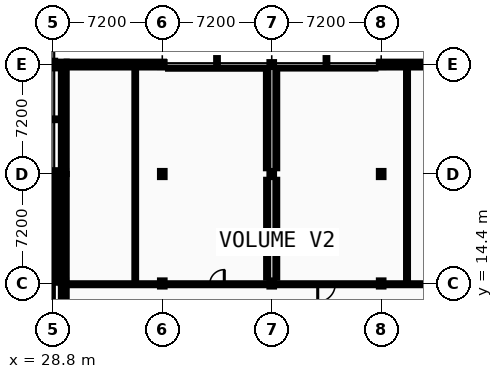
"""IFC4 building model, lengths in metres.
Left out: names, types, materials, properties, quantities, classifications, styles, units other than length and angle.
Written with IfcOpenShell. Run it as: python <this file> out.ifc"""

import sys

from ifc_helpers import new_model, si_unit, direction, frame, frame_2d, origin, origin_2d, place, context, subcontext, project, spatial, rectangle, i_section, extrude, element, fill, save


model = new_model("IFC4")
c1 = context("Model", 3, precision=1e-05, world=origin(), true_north=direction((0.0, 1.0)))
c2 = subcontext(c1, "Body", "Model", "MODEL_VIEW")
j1 = project(units=[si_unit("LENGTHUNIT", "METRE"), si_unit("PLANEANGLEUNIT", "RADIAN")], contexts=[c1])
p1 = place(None, origin())
s1 = spatial("IfcSite", under=j1, at=p1, CompositionType="ELEMENT")
p2 = place(p1, origin())
s2 = spatial("IfcBuilding", under=s1, at=p2, CompositionType="ELEMENT")
p3 = place(p2, frame((0.0, 0.0, 5.2)))
s3 = spatial("IfcBuildingStorey", under=s2, at=p3, CompositionType="ELEMENT", Elevation=5.2)
for number, where, z_axis, x_axis in (
    (1, (28.8, 21.6, 0.0), (0.0, 0.0, 1.0), (1.0, 0.0, 0.0)),
    (2, (28.8, 28.8, 0.0), (0.0, 0.0, 1.0), (1.0, 0.0, 0.0)),
):
    element("IfcColumn", number, at=place(p3, frame(where, z_axis=z_axis, x_axis=x_axis)), inside=s3, PredefinedType="COLUMN", context=c2, shape_type="SweptSolid", body=[
        extrude(i_section(OverallWidth=0.3, OverallDepth=0.5, WebThickness=0.014, FlangeThickness=0.028, FilletRadius=0.027, at=origin_2d()), origin(), (0.0, 0.0, 1.0), 4.4),
    ])
for number, where, z_axis, x_axis in (
    (3, (29.52, 14.4, 0.0), (0.0, 0.0, 1.0), (1.0, 0.0, 0.0)),
    (4, (29.52, 21.6, 0.0), (0.0, 0.0, 1.0), (1.0, 0.0, 0.0)),
):
    element("IfcColumn", number, at=place(p3, frame(where, z_axis=z_axis, x_axis=x_axis)), inside=s3, PredefinedType="COLUMN", context=c2, shape_type="SweptSolid", body=[
        extrude(i_section(OverallWidth=0.3, OverallDepth=0.4, WebThickness=0.013, FlangeThickness=0.024, FilletRadius=0.027, at=origin_2d()), origin(), (0.0, 0.0, 1.0), 4.4),
    ])
p4 = place(p3, frame((29.52, 28.8, 0.0), z_axis=(0.0, 0.0, 1.0), x_axis=(1.0, 0.0, 0.0)))
e5 = element("IfcColumn", 5, at=p4, inside=s3, PredefinedType="COLUMN", context=c2, shape_type="SweptSolid", body=[
    extrude(i_section(OverallWidth=0.3, OverallDepth=0.32, WebThickness=0.011, FlangeThickness=0.021, FilletRadius=0.027, at=origin_2d()), origin(), (0.0, 0.0, 1.0), 4.4),
])
for number, where, z_axis, x_axis in (
    (6, (36.0, 14.4, 0.0), (0.0, 0.0, 1.0), (1.0, 0.0, 0.0)),
    (7, (36.0, 21.6, 0.0), (0.0, 0.0, 1.0), (1.0, 0.0, 0.0)),
):
    element("IfcColumn", number, at=place(p3, frame(where, z_axis=z_axis, x_axis=x_axis)), inside=s3, PredefinedType="COLUMN", context=c2, shape_type="SweptSolid", body=[
        extrude(i_section(OverallWidth=0.3, OverallDepth=0.4, WebThickness=0.013, FlangeThickness=0.024, FilletRadius=0.027, at=origin_2d()), origin(), (0.0, 0.0, 1.0), 4.4),
    ])
p5 = place(p3, frame((36.0, 28.8, 0.0), z_axis=(0.0, 0.0, 1.0), x_axis=(1.0, 0.0, 0.0)))
e8 = element("IfcColumn", 8, at=p5, inside=s3, PredefinedType="COLUMN", context=c2, shape_type="SweptSolid", body=[
    extrude(i_section(OverallWidth=0.3, OverallDepth=0.32, WebThickness=0.011, FlangeThickness=0.021, FilletRadius=0.027, at=origin_2d()), origin(), (0.0, 0.0, 1.0), 4.4),
])
for number, where, z_axis, x_axis in (
    (9, (43.2, 14.4, 0.0), (0.0, 0.0, 1.0), (1.0, 0.0, 0.0)),
    (10, (43.2, 21.6, 0.0), (0.0, 0.0, 1.0), (1.0, 0.0, 0.0)),
):
    element("IfcColumn", number, at=place(p3, frame(where, z_axis=z_axis, x_axis=x_axis)), inside=s3, PredefinedType="COLUMN", context=c2, shape_type="SweptSolid", body=[
        extrude(i_section(OverallWidth=0.3, OverallDepth=0.4, WebThickness=0.013, FlangeThickness=0.024, FilletRadius=0.027, at=origin_2d()), origin(), (0.0, 0.0, 1.0), 4.4),
    ])
p6 = place(p3, frame((43.2, 28.8, 0.0), z_axis=(0.0, 0.0, 1.0), x_axis=(1.0, 0.0, 0.0)))
e11 = element("IfcColumn", 11, at=p6, inside=s3, PredefinedType="COLUMN", context=c2, shape_type="SweptSolid", body=[
    extrude(i_section(OverallWidth=0.3, OverallDepth=0.32, WebThickness=0.011, FlangeThickness=0.021, FilletRadius=0.027, at=origin_2d()), origin(), (0.0, 0.0, 1.0), 4.4),
])
for number, where, z_axis, x_axis in (
    (12, (50.4, 14.4, 0.0), (0.0, 0.0, 1.0), (1.0, 0.0, 0.0)),
    (13, (50.4, 21.6, 0.0), (0.0, 0.0, 1.0), (1.0, 0.0, 0.0)),
):
    element("IfcColumn", number, at=place(p3, frame(where, z_axis=z_axis, x_axis=x_axis)), inside=s3, PredefinedType="COLUMN", context=c2, shape_type="SweptSolid", body=[
        extrude(i_section(OverallWidth=0.3, OverallDepth=0.4, WebThickness=0.013, FlangeThickness=0.024, FilletRadius=0.027, at=origin_2d()), origin(), (0.0, 0.0, 1.0), 4.4),
    ])
p7 = place(p3, frame((50.4, 28.8, 0.0), z_axis=(0.0, 0.0, 1.0), x_axis=(1.0, 0.0, 0.0)))
e14 = element("IfcColumn", 14, at=p7, inside=s3, PredefinedType="COLUMN", context=c2, shape_type="SweptSolid", body=[
    extrude(i_section(OverallWidth=0.3, OverallDepth=0.32, WebThickness=0.011, FlangeThickness=0.021, FilletRadius=0.027, at=origin_2d()), origin(), (0.0, 0.0, 1.0), 4.4),
])
p8 = place(p3, frame((28.8, 14.45, 0.0), z_axis=(0.0, 0.0, 1.0), x_axis=(0.0, 1.0, 0.0)))
e15 = element("IfcWall", 15, at=p8, inside=s3, PredefinedType="STANDARD", context=c2, shape_type="SweptSolid", body=[
    extrude(rectangle(XDim=7.15, YDim=0.38, at=frame_2d((3.575, 0.0))), origin(), (0.0, 0.0, 1.0), 4.185),
])
p9 = place(p8, frame((1.63, 0.0, 0.95)))
e16 = element("IfcOpeningElement", 16, at=p9, cuts=e15, PredefinedType="OPENING", context=c2, shape_type="SweptSolid", body=[
    extrude(rectangle(XDim=1.03, YDim=1.296, at=frame_2d((0.515, 0.648))), frame((0.0, 0.2, 0.0), z_axis=(0.0, -1.0, 0.0), x_axis=(1.0, 0.0, 0.0)), (0.0, 0.0, 1.0), 0.4),
])
p10 = place(p8, frame((4.49, 0.0, 0.95)))
e17 = element("IfcOpeningElement", 17, at=p10, cuts=e15, PredefinedType="OPENING", context=c2, shape_type="SweptSolid", body=[
    extrude(rectangle(XDim=1.03, YDim=1.296, at=frame_2d((0.515, 0.648))), frame((0.0, 0.2, 0.0), z_axis=(0.0, -1.0, 0.0), x_axis=(1.0, 0.0, 0.0)), (0.0, 0.0, 1.0), 0.4),
])
p11 = place(p3, frame((36.11, 28.8, 0.0), z_axis=(0.0, 0.0, 1.0), x_axis=(-1.0, 0.0, 0.0)))
e18 = element("IfcWall", 18, at=p11, inside=s3, PredefinedType="STANDARD", context=c2, shape_type="SweptSolid", body=[
    extrude(rectangle(XDim=6.4, YDim=0.38, at=frame_2d((3.2, 0.0))), origin(), (0.0, 0.0, 1.0), 3.88),
])
p12 = place(p3, frame((57.41, 28.8, 0.0), z_axis=(0.0, 0.0, 1.0), x_axis=(-1.0, 0.0, 0.0)))
e19 = element("IfcWall", 19, at=p12, inside=s3, PredefinedType="STANDARD", context=c2, shape_type="SweptSolid", body=[
    extrude(rectangle(XDim=7.12, YDim=0.38, at=frame_2d((3.56, 0.0))), origin(), (0.0, 0.0, 1.0), 3.88),
])
p13 = place(p12, frame((1.672, 0.0, 0.95)))
e20 = element("IfcOpeningElement", 20, at=p13, cuts=e19, PredefinedType="OPENING", context=c2, shape_type="SweptSolid", body=[
    extrude(rectangle(XDim=0.928, YDim=1.332, at=frame_2d((0.464, 0.666))), frame((0.0, 0.2, 0.0), z_axis=(0.0, -1.0, 0.0), x_axis=(1.0, 0.0, 0.0)), (0.0, 0.0, 1.0), 0.4),
])
p14 = place(p3, frame((29.52, 14.4, 0.0), z_axis=(0.0, 0.0, 1.0), x_axis=(0.0, -1.0, 0.0)))
e21 = element("IfcWall", 21, at=p14, inside=s3, PredefinedType="STANDARD", context=c2, shape_type="SweptSolid", body=[
    extrude(rectangle(XDim=5.5, YDim=0.38, at=frame_2d((2.75, 0.0))), origin(), (0.0, 0.0, 1.0), 4.185),
])
p15 = place(p3, frame((29.52, 21.6, 0.0), z_axis=(0.0, 0.0, 1.0), x_axis=(0.0, -1.0, 0.0)))
e22 = element("IfcWall", 22, at=p15, inside=s3, PredefinedType="STANDARD", context=c2, shape_type="SweptSolid", body=[
    extrude(rectangle(XDim=7.2, YDim=0.38, at=frame_2d((3.6, 0.0))), origin(), (0.0, 0.0, 1.0), 3.88),
])
p16 = place(p15, frame((1.645, 0.0, 0.95)))
e23 = element("IfcOpeningElement", 23, at=p16, cuts=e22, PredefinedType="OPENING", context=c2, shape_type="SweptSolid", body=[
    extrude(rectangle(XDim=1.03, YDim=1.332, at=frame_2d((0.515, 0.666))), frame((0.0, 0.2, 0.0), z_axis=(0.0, -1.0, 0.0), x_axis=(1.0, 0.0, 0.0)), (0.0, 0.0, 1.0), 0.4),
])
p17 = place(p15, frame((4.525, 0.0, 0.95)))
e24 = element("IfcOpeningElement", 24, at=p17, cuts=e22, PredefinedType="OPENING", context=c2, shape_type="SweptSolid", body=[
    extrude(rectangle(XDim=1.03, YDim=1.332, at=frame_2d((0.515, 0.666))), frame((0.0, 0.2, 0.0), z_axis=(0.0, -1.0, 0.0), x_axis=(1.0, 0.0, 0.0)), (0.0, 0.0, 1.0), 0.4),
])
p18 = place(p3, frame((29.52, 28.99, 0.0), z_axis=(0.0, 0.0, 1.0), x_axis=(0.0, -1.0, 0.0)))
e25 = element("IfcWall", 25, at=p18, inside=s3, PredefinedType="STANDARD", context=c2, shape_type="SweptSolid", body=[
    extrude(rectangle(XDim=7.39, YDim=0.38, at=frame_2d((3.695, 0.0))), origin(), (0.0, 0.0, 1.0), 3.88),
])
p19 = place(p18, frame((1.685, 0.0, 0.95)))
e26 = element("IfcOpeningElement", 26, at=p19, cuts=e25, PredefinedType="OPENING", context=c2, shape_type="SweptSolid", body=[
    extrude(rectangle(XDim=1.064, YDim=1.332, at=frame_2d((0.532, 0.666))), frame((0.0, 0.2, 0.0), z_axis=(0.0, -1.0, 0.0), x_axis=(1.0, 0.0, 0.0)), (0.0, 0.0, 1.0), 0.4),
])
p20 = place(p18, frame((4.641, 0.0, 0.95)))
e27 = element("IfcOpeningElement", 27, at=p20, cuts=e25, PredefinedType="OPENING", context=c2, shape_type="SweptSolid", body=[
    extrude(rectangle(XDim=1.064, YDim=1.332, at=frame_2d((0.532, 0.666))), frame((0.0, 0.2, 0.0), z_axis=(0.0, -1.0, 0.0), x_axis=(1.0, 0.0, 0.0)), (0.0, 0.0, 1.0), 0.4),
])
p21 = place(p3, frame((28.6, 5.85, 0.0), z_axis=(0.0, 0.0, 1.0), x_axis=(0.0, 1.0, 0.0)))
e28 = element("IfcWall", 28, at=p21, inside=s3, PredefinedType="SHEAR", context=c2, shape_type="SweptSolid", body=[
    extrude(rectangle(XDim=8.6, YDim=0.4, at=frame_2d((4.3, 0.0))), origin(), (0.0, 0.0, 1.0), 4.185),
])
p22 = place(p3, frame((29.9, 14.35, 0.0), z_axis=(0.0, 0.0, 1.0), x_axis=(1.0, 0.0, 0.0)))
e29 = element("IfcWall", 29, at=p22, inside=s3, PredefinedType="PARTITIONING", context=c2, shape_type="SweptSolid", body=[
    extrude(rectangle(XDim=5.72, YDim=0.125, at=frame_2d((2.86, 0.0))), origin(), (0.0, 0.0, 1.0), 3.88),
])
p23 = place(p22, frame((2.87, 0.0, 0.0)))
e30 = element("IfcOpeningElement", 30, at=p23, cuts=e29, PredefinedType="OPENING", context=c2, shape_type="SweptSolid", body=[
    extrude(rectangle(XDim=1.0, YDim=2.1, at=frame_2d((0.5, 1.05))), frame((0.0, 0.073, 0.0), z_axis=(0.0, -1.0, 0.0), x_axis=(1.0, 0.0, 0.0)), (0.0, 0.0, 1.0), 0.145),
])
p24 = place(p3, frame((36.38, 14.35, 0.0), z_axis=(0.0, 0.0, 1.0), x_axis=(1.0, 0.0, 0.0)))
e31 = element("IfcWall", 31, at=p24, inside=s3, PredefinedType="PARTITIONING", context=c2, shape_type="SweptSolid", body=[
    extrude(rectangle(XDim=6.44, YDim=0.125, at=frame_2d((3.22, 0.0))), origin(), (0.0, 0.0, 1.0), 3.88),
])
p25 = place(p24, frame((2.741, 0.0, 0.0)))
e32 = element("IfcOpeningElement", 32, at=p25, cuts=e31, PredefinedType="OPENING", context=c2, shape_type="SweptSolid", body=[
    extrude(rectangle(XDim=0.958, YDim=2.124, at=frame_2d((0.479, 1.062))), frame((0.0, 0.073, 0.0), z_axis=(0.0, -1.0, 0.0), x_axis=(1.0, 0.0, 0.0)), (0.0, 0.0, 1.0), 0.145),
])
p26 = place(p3, frame((43.58, 14.35, 0.0), z_axis=(0.0, 0.0, 1.0), x_axis=(1.0, 0.0, 0.0)))
e33 = element("IfcWall", 33, at=p26, inside=s3, PredefinedType="PARTITIONING", context=c2, shape_type="SweptSolid", body=[
    extrude(rectangle(XDim=6.44, YDim=0.125, at=frame_2d((3.22, 0.0))), origin(), (0.0, 0.0, 1.0), 3.88),
])
p27 = place(p26, frame((2.645, 0.0, 0.0)))
e34 = element("IfcOpeningElement", 34, at=p27, cuts=e33, PredefinedType="OPENING", context=c2, shape_type="SweptSolid", body=[
    extrude(rectangle(XDim=1.15, YDim=2.15, at=frame_2d((0.575, 1.075))), frame((0.0, 0.073, 0.0), z_axis=(0.0, -1.0, 0.0), x_axis=(1.0, 0.0, 0.0)), (0.0, 0.0, 1.0), 0.145),
])
p28 = place(p3, frame((50.78, 14.35, 0.0), z_axis=(0.0, 0.0, 1.0), x_axis=(1.0, 0.0, 0.0)))
e35 = element("IfcWall", 35, at=p28, inside=s3, PredefinedType="PARTITIONING", context=c2, shape_type="SweptSolid", body=[
    extrude(rectangle(XDim=6.44, YDim=0.125, at=frame_2d((3.22, 0.0))), origin(), (0.0, 0.0, 1.0), 3.88),
])
p29 = place(p28, frame((3.43, 0.0, 0.0)))
e36 = element("IfcOpeningElement", 36, at=p29, cuts=e35, PredefinedType="OPENING", context=c2, shape_type="SweptSolid", body=[
    extrude(rectangle(XDim=0.9, YDim=2.1, at=frame_2d((0.45, 1.05))), frame((0.0, 0.073, 0.0), z_axis=(0.0, -1.0, 0.0), x_axis=(1.0, 0.0, 0.0)), (0.0, 0.0, 1.0), 0.145),
])
p30 = place(p3, frame((36.38, 28.6, 0.0), z_axis=(0.0, 0.0, 1.0), x_axis=(1.0, 0.0, 0.0)))
e37 = element("IfcWall", 37, at=p30, inside=s3, PredefinedType="PARTITIONING", context=c2, shape_type="SweptSolid", body=[
    extrude(rectangle(XDim=6.44, YDim=0.142, at=frame_2d((3.22, 0.0))), origin(), (0.0, 0.0, 1.0), 3.88),
])
p31 = place(p3, frame((43.58, 28.6, 0.0), z_axis=(0.0, 0.0, 1.0), x_axis=(1.0, 0.0, 0.0)))
e38 = element("IfcWall", 38, at=p31, inside=s3, PredefinedType="PARTITIONING", context=c2, shape_type="SweptSolid", body=[
    extrude(rectangle(XDim=6.44, YDim=0.118, at=frame_2d((3.22, 0.0))), origin(), (0.0, 0.0, 1.0), 3.88),
])
p32 = place(p3, frame((34.22, 14.413, 0.0), z_axis=(0.0, 0.0, 1.0), x_axis=(0.0, 1.0, 0.0)))
e39 = element("IfcWall", 39, at=p32, inside=s3, PredefinedType="PARTITIONING", context=c2, shape_type="SweptSolid", body=[
    extrude(rectangle(XDim=14.188, YDim=0.11, at=frame_2d((7.094, 0.0))), origin(), (0.0, 0.0, 1.0), 4.185),
])
p33 = place(p3, frame((42.9, 14.78, 0.0), z_axis=(0.0, 0.0, 1.0), x_axis=(0.0, 1.0, 0.0)))
e40 = element("IfcWall", 40, at=p33, inside=s3, PredefinedType="PARTITIONING", context=c2, shape_type="SweptSolid", body=[
    extrude(rectangle(XDim=6.44, YDim=0.135, at=frame_2d((3.22, 0.0))), origin(), (0.0, 0.0, 1.0), 4.185),
])
p34 = place(p3, frame((42.9, 21.98, 0.0), z_axis=(0.0, 0.0, 1.0), x_axis=(0.0, 1.0, 0.0)))
e41 = element("IfcWall", 41, at=p34, inside=s3, PredefinedType="PARTITIONING", context=c2, shape_type="SweptSolid", body=[
    extrude(rectangle(XDim=6.44, YDim=0.16, at=frame_2d((3.22, 0.0))), origin(), (0.0, 0.0, 1.0), 3.88),
])
for number, where, z_axis, x_axis in (
    (42, (43.5, 14.78, 0.0), (0.0, 0.0, 1.0), (0.0, 1.0, 0.0)),
    (43, (43.5, 21.98, 0.0), (0.0, 0.0, 1.0), (0.0, 1.0, 0.0)),
):
    element("IfcWall", number, at=place(p3, frame(where, z_axis=z_axis, x_axis=x_axis)), inside=s3, PredefinedType="PARTITIONING", context=c2, shape_type="SweptSolid", body=[
        extrude(rectangle(XDim=6.44, YDim=0.118, at=frame_2d((3.22, 0.0))), origin(), (0.0, 0.0, 1.0), 4.185),
    ])
p35 = place(p3, frame((52.1, 14.413, 0.0), z_axis=(0.0, 0.0, 1.0), x_axis=(0.0, 1.0, 0.0)))
e44 = element("IfcWall", 44, at=p35, inside=s3, PredefinedType="PARTITIONING", context=c2, shape_type="SweptSolid", body=[
    extrude(rectangle(XDim=14.188, YDim=0.125, at=frame_2d((7.094, 0.0))), origin(), (0.0, 0.0, 1.0), 4.185),
])
p36 = place(p9, origin())
e45 = element("IfcWindow", 45, at=p36, inside=s3, PartitioningType="SINGLE_PANEL", PredefinedType="WINDOW", context=c2, shape_type="SweptSolid", body=[
    extrude(rectangle(XDim=1.03, YDim=1.296, at=frame_2d((0.515, 0.648))), frame((0.0, 0.03, 0.0), z_axis=(0.0, -1.0, 0.0), x_axis=(1.0, 0.0, 0.0)), (0.0, 0.0, 1.0), 0.06),
])
fill(e16, e45)
p37 = place(p10, origin())
e46 = element("IfcWindow", 46, at=p37, inside=s3, PartitioningType="SINGLE_PANEL", PredefinedType="WINDOW", context=c2, shape_type="SweptSolid", body=[
    extrude(rectangle(XDim=1.03, YDim=1.296, at=frame_2d((0.515, 0.648))), frame((0.0, 0.03, 0.0), z_axis=(0.0, -1.0, 0.0), x_axis=(1.0, 0.0, 0.0)), (0.0, 0.0, 1.0), 0.06),
])
fill(e17, e46)
p38 = place(p16, origin())
e47 = element("IfcWindow", 47, at=p38, inside=s3, PartitioningType="SINGLE_PANEL", PredefinedType="WINDOW", context=c2, shape_type="SweptSolid", body=[
    extrude(rectangle(XDim=1.03, YDim=1.332, at=frame_2d((0.515, 0.666))), frame((0.0, 0.03, 0.0), z_axis=(0.0, -1.0, 0.0), x_axis=(1.0, 0.0, 0.0)), (0.0, 0.0, 1.0), 0.06),
])
fill(e23, e47)
p39 = place(p17, origin())
e48 = element("IfcWindow", 48, at=p39, inside=s3, PartitioningType="SINGLE_PANEL", PredefinedType="WINDOW", context=c2, shape_type="SweptSolid", body=[
    extrude(rectangle(XDim=1.03, YDim=1.332, at=frame_2d((0.515, 0.666))), frame((0.0, 0.03, 0.0), z_axis=(0.0, -1.0, 0.0), x_axis=(1.0, 0.0, 0.0)), (0.0, 0.0, 1.0), 0.06),
])
fill(e24, e48)
p40 = place(p19, origin())
e49 = element("IfcWindow", 49, at=p40, inside=s3, PartitioningType="SINGLE_PANEL", PredefinedType="WINDOW", context=c2, shape_type="SweptSolid", body=[
    extrude(rectangle(XDim=1.064, YDim=1.332, at=frame_2d((0.532, 0.666))), frame((0.0, 0.03, 0.0), z_axis=(0.0, -1.0, 0.0), x_axis=(1.0, 0.0, 0.0)), (0.0, 0.0, 1.0), 0.06),
])
fill(e26, e49)
p41 = place(p20, origin())
e50 = element("IfcWindow", 50, at=p41, inside=s3, PartitioningType="SINGLE_PANEL", PredefinedType="WINDOW", context=c2, shape_type="SweptSolid", body=[
    extrude(rectangle(XDim=1.064, YDim=1.332, at=frame_2d((0.532, 0.666))), frame((0.0, 0.03, 0.0), z_axis=(0.0, -1.0, 0.0), x_axis=(1.0, 0.0, 0.0)), (0.0, 0.0, 1.0), 0.06),
])
fill(e27, e50)
p42 = place(p23, frame((1.0, 0.0, 0.0), z_axis=(0.0, 0.0, 1.0), x_axis=(-1.0, 0.0, 0.0)))
e51 = element("IfcDoor", 51, at=p42, inside=s3, OperationType="SLIDING_TO_LEFT", PredefinedType="DOOR", context=c2, shape_type="SweptSolid", body=[
    extrude(rectangle(XDim=1.0, YDim=2.1, at=frame_2d((0.5, 1.05))), frame((0.0, 0.025, 0.0), z_axis=(0.0, -1.0, 0.0), x_axis=(1.0, 0.0, 0.0)), (0.0, 0.0, 1.0), 0.05),
])
fill(e30, e51)
p43 = place(p27, frame((1.15, 0.0, 0.0), z_axis=(0.0, 0.0, 1.0), x_axis=(-1.0, 0.0, 0.0)))
e52 = element("IfcDoor", 52, at=p43, inside=s3, OperationType="SINGLE_SWING_LEFT", PredefinedType="DOOR", context=c2, shape_type="SweptSolid", body=[
    extrude(rectangle(XDim=1.15, YDim=2.15, at=frame_2d((0.575, 1.075))), frame((0.0, 0.025, 0.0), z_axis=(0.0, -1.0, 0.0), x_axis=(1.0, 0.0, 0.0)), (0.0, 0.0, 1.0), 0.05),
])
fill(e34, e52)
p44 = place(p25, frame((0.958, 0.0, 0.0), z_axis=(0.0, 0.0, 1.0), x_axis=(-1.0, 0.0, 0.0)))
e53 = element("IfcDoor", 53, at=p44, inside=s3, OperationType="SINGLE_SWING_RIGHT", PredefinedType="DOOR", context=c2, shape_type="SweptSolid", body=[
    extrude(rectangle(XDim=0.958, YDim=2.124, at=frame_2d((0.479, 1.062))), frame((0.0, 0.025, 0.0), z_axis=(0.0, -1.0, 0.0), x_axis=(1.0, 0.0, 0.0)), (0.0, 0.0, 1.0), 0.05),
])
fill(e32, e53)
save(model, sys.argv[1])
